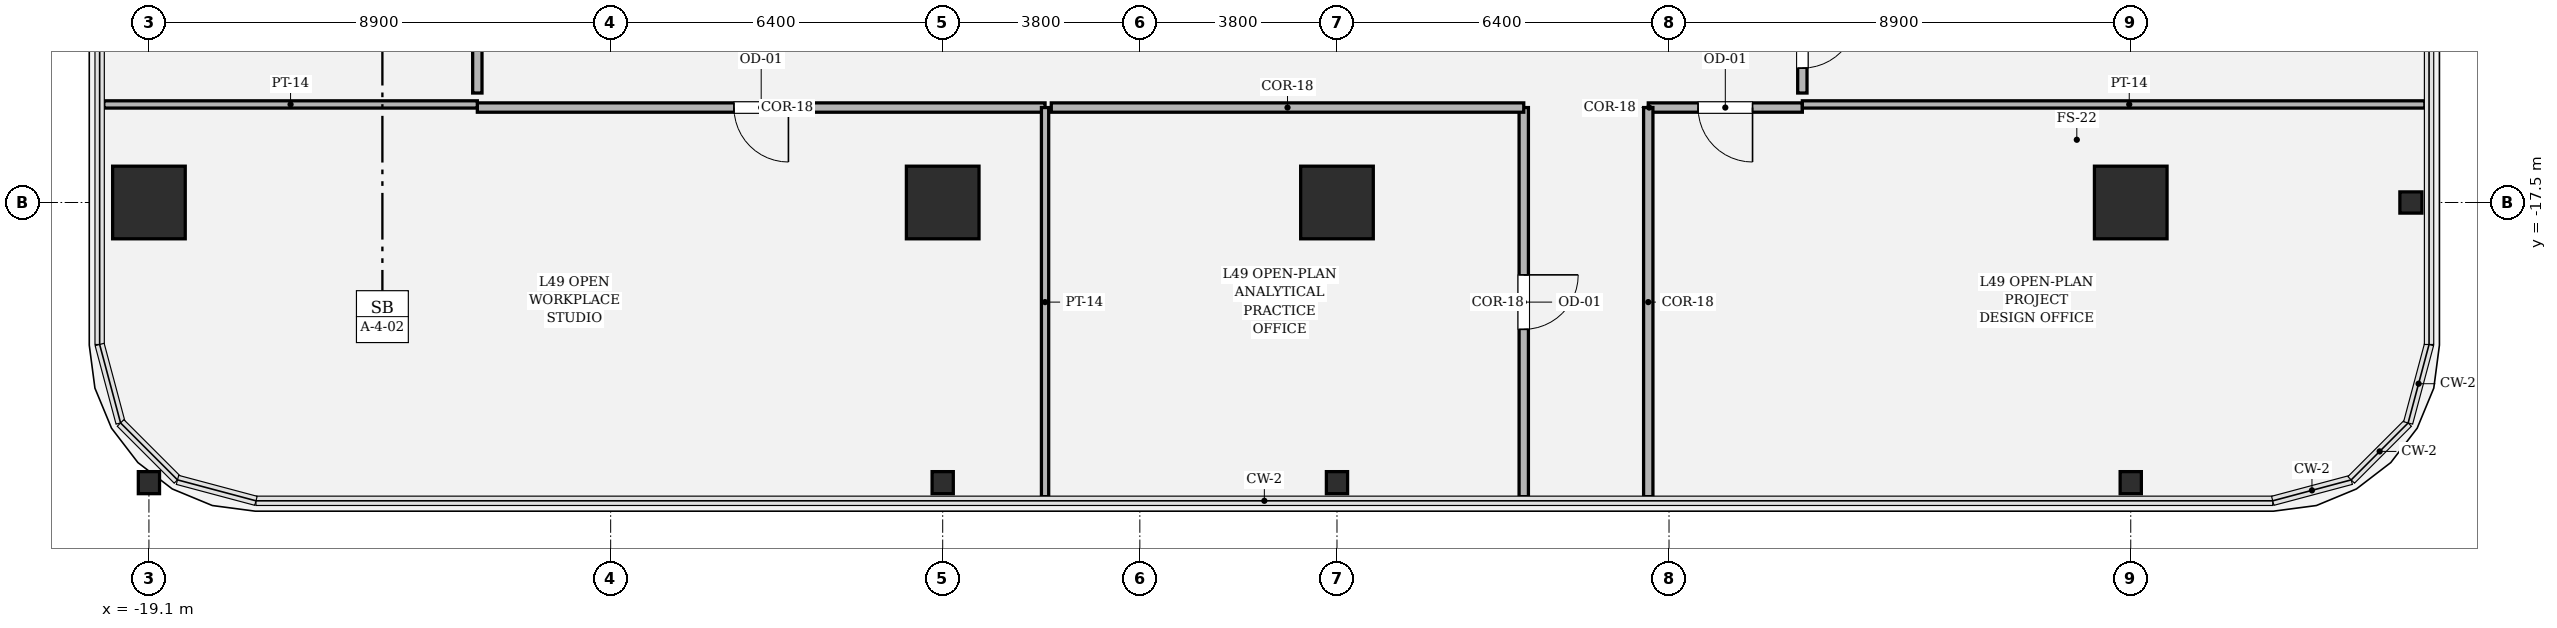
"""IFC4 building model, lengths in metres.
Left out: names, types, materials, properties, quantities, classifications, styles, units other than length and angle.
Written with IfcOpenShell. Run it as: python <this file> out.ifc"""

import sys

from ifc_helpers import new_model, si_unit, direction, frame, frame_2d, origin, origin_2d, place, context, subcontext, project, spatial, rectangle, hollow_rectangle, i_section, extrude, element, fill, save


model = new_model("IFC4")
c1 = context("Model", 3, precision=1e-05, world=origin(), true_north=direction((0.0, 1.0)))
c2 = subcontext(c1, "Body", "Model", "MODEL_VIEW")
j1 = project(units=[si_unit("LENGTHUNIT", "METRE"), si_unit("PLANEANGLEUNIT", "RADIAN")], contexts=[c1])
p1 = place(None, origin())
s1 = spatial("IfcSite", under=j1, at=p1, CompositionType="ELEMENT")
p2 = place(p1, origin())
s2 = spatial("IfcBuilding", under=s1, at=p2, CompositionType="ELEMENT")
p3 = place(p2, frame((0.0, 0.0, 208.65)))
s3 = spatial("IfcBuildingStorey", under=s2, at=p3, CompositionType="ELEMENT", Elevation=208.65)
for number, where, z_axis, x_axis in (
    (1, (-19.1, -17.5, 0.0), (0.0, 0.0, 1.0), (1.0, 0.0, 0.0)),
    (2, (-3.8, -17.5, 0.0), (0.0, 0.0, 1.0), (1.0, 0.0, 0.0)),
    (3, (3.8, -17.5, 0.0), (0.0, 0.0, 1.0), (1.0, 0.0, 0.0)),
    (4, (19.1, -17.5, 0.0), (0.0, 0.0, 1.0), (1.0, 0.0, 0.0)),
):
    element("IfcColumn", number, at=place(p3, frame(where, z_axis=z_axis, x_axis=x_axis)), inside=s3, PredefinedType="COLUMN", context=c2, shape_type="SweptSolid", body=[
        extrude(hollow_rectangle(XDim=1.4, YDim=1.4, WallThickness=0.042, at=origin_2d()), origin(), (0.0, 0.0, 1.0), 4.05),
    ])
for number, where, z_axis, x_axis in (
    (5, (-19.1, -22.9, 0.0), (0.0, 0.0, 1.0), (1.0, 0.0, 0.0)),
    (6, (-3.8, -22.9, 0.0), (0.0, 0.0, 1.0), (1.0, 0.0, 0.0)),
    (7, (3.8, -22.9, 0.0), (0.0, 0.0, 1.0), (1.0, 0.0, 0.0)),
    (8, (19.1, -22.9, 0.0), (0.0, 0.0, 1.0), (1.0, 0.0, 0.0)),
    (9, (24.5, -17.5, 0.0), (0.0, 0.0, 1.0), (0.0, 1.0, 0.0)),
):
    element("IfcColumn", number, at=place(p3, frame(where, z_axis=z_axis, x_axis=x_axis)), inside=s3, PredefinedType="COLUMN", context=c2, shape_type="SweptSolid", body=[
        extrude(i_section(OverallWidth=0.409, OverallDepth=0.425, WebThickness=0.032, FlangeThickness=0.052, FilletRadius=0.018, at=origin_2d()), origin(), (0.0, 0.0, 1.0), 4.048),
    ])
p4 = place(p3, frame((-12.77, -15.67, 0.0), z_axis=(0.0, 0.0, 1.0), x_axis=(1.0, 0.0, 0.0)))
e10 = element("IfcWall", 10, at=p4, inside=s3, PredefinedType="PARTITIONING", context=c2, shape_type="SweptSolid", body=[
    extrude(rectangle(XDim=10.943, YDim=0.18, at=frame_2d((5.472, 0.0))), origin(), (0.0, 0.0, 1.0), 3.174),
])
p5 = place(p4, frame((4.947, 0.0, 0.0)))
e11 = element("IfcOpeningElement", 11, at=p5, cuts=e10, PredefinedType="OPENING", context=c2, shape_type="SweptSolid", body=[
    extrude(rectangle(XDim=1.05, YDim=2.2, at=frame_2d((0.525, 1.1))), frame((0.0, 0.1, 0.0), z_axis=(0.0, -1.0, 0.0), x_axis=(1.0, 0.0, 0.0)), (0.0, 0.0, 1.0), 0.2),
])
p6 = place(p3, frame((-1.827, -15.67, 0.0), z_axis=(0.0, 0.0, 1.0), x_axis=(0.0, -1.0, 0.0)))
e12 = element("IfcWall", 12, at=p6, inside=s3, PredefinedType="PARTITIONING", context=c2, shape_type="SweptSolid", body=[
    extrude(rectangle(XDim=7.5, YDim=0.14, at=frame_2d((3.75, 0.0))), origin(), (0.0, 0.0, 1.0), 2.544),
])
p7 = place(p3, frame((-19.97, -15.61, 0.0), z_axis=(0.0, 0.0, 1.0), x_axis=(1.0, 0.0, 0.0)))
e13 = element("IfcWall", 13, at=p7, inside=s3, PredefinedType="PARTITIONING", context=c2, shape_type="SweptSolid", body=[
    extrude(rectangle(XDim=7.2, YDim=0.14, at=frame_2d((3.6, 0.0))), origin(), (0.0, 0.0, 1.0), 3.174),
])
p8 = place(p3, frame((7.4, -15.67, 0.0), z_axis=(0.0, 0.0, 1.0), x_axis=(0.0, -1.0, 0.0)))
e14 = element("IfcWall", 14, at=p8, inside=s3, PredefinedType="PARTITIONING", context=c2, shape_type="SweptSolid", body=[
    extrude(rectangle(XDim=7.5, YDim=0.18, at=frame_2d((3.75, 0.0))), origin(), (0.0, 0.0, 1.0), 2.544),
])
p9 = place(p8, frame((3.225, 0.0, 0.0)))
e15 = element("IfcOpeningElement", 15, at=p9, cuts=e14, PredefinedType="OPENING", context=c2, shape_type="SweptSolid", body=[
    extrude(rectangle(XDim=1.05, YDim=2.2, at=frame_2d((0.525, 1.1))), frame((0.0, 0.1, 0.0), z_axis=(0.0, -1.0, 0.0), x_axis=(1.0, 0.0, 0.0)), (0.0, 0.0, 1.0), 0.2),
])
p10 = place(p3, frame((-1.707, -15.67, 0.0), z_axis=(0.0, 0.0, 1.0), x_axis=(1.0, 0.0, 0.0)))
e16 = element("IfcWall", 16, at=p10, inside=s3, PredefinedType="PARTITIONING", context=c2, shape_type="SweptSolid", body=[
    extrude(rectangle(XDim=9.107, YDim=0.18, at=frame_2d((4.553, 0.0))), origin(), (0.0, 0.0, 1.0), 3.174),
])
p11 = place(p3, frame((9.8, -15.67, 0.0), z_axis=(0.0, 0.0, 1.0), x_axis=(1.0, 0.0, 0.0)))
e17 = element("IfcWall", 17, at=p11, inside=s3, PredefinedType="PARTITIONING", context=c2, shape_type="SweptSolid", body=[
    extrude(rectangle(XDim=2.97, YDim=0.18, at=frame_2d((1.485, 0.0))), origin(), (0.0, 0.0, 1.0), 3.174),
])
p12 = place(p11, frame((0.96, 0.0, 0.0)))
e18 = element("IfcOpeningElement", 18, at=p12, cuts=e17, PredefinedType="OPENING", context=c2, shape_type="SweptSolid", body=[
    extrude(rectangle(XDim=1.05, YDim=2.2, at=frame_2d((0.525, 1.1))), frame((0.0, 0.1, 0.0), z_axis=(0.0, -1.0, 0.0), x_axis=(1.0, 0.0, 0.0)), (0.0, 0.0, 1.0), 0.2),
])
p13 = place(p3, frame((12.77, -15.61, 0.0), z_axis=(0.0, 0.0, 1.0), x_axis=(1.0, 0.0, 0.0)))
e19 = element("IfcWall", 19, at=p13, inside=s3, PredefinedType="PARTITIONING", context=c2, shape_type="SweptSolid", body=[
    extrude(rectangle(XDim=12.0, YDim=0.14, at=frame_2d((6.0, 0.0))), origin(), (0.0, 0.0, 1.0), 2.544),
])
p14 = place(p3, frame((9.8, -23.17, 0.0), z_axis=(0.0, 0.0, 1.0), x_axis=(0.0, 1.0, 0.0)))
e20 = element("IfcWall", 20, at=p14, inside=s3, PredefinedType="PARTITIONING", context=c2, shape_type="SweptSolid", body=[
    extrude(rectangle(XDim=7.5, YDim=0.18, at=frame_2d((3.75, 0.0))), origin(), (0.0, 0.0, 1.0), 2.544),
])
p15 = place(p3, frame((-12.77, -13.38, 0.0), z_axis=(0.0, 0.0, 1.0), x_axis=(0.0, -1.0, 0.0)))
e21 = element("IfcWall", 21, at=p15, inside=s3, PredefinedType="PARTITIONING", context=c2, shape_type="SweptSolid", body=[
    extrude(rectangle(XDim=2.01, YDim=0.18, at=frame_2d((1.005, 0.0))), origin(), (0.0, 0.0, 1.0), 3.424),
])
p16 = place(p3, frame((12.77, -15.39, 0.0), z_axis=(0.0, 0.0, 1.0), x_axis=(0.0, 1.0, 0.0)))
e22 = element("IfcWall", 22, at=p16, inside=s3, PredefinedType="PARTITIONING", context=c2, shape_type="SweptSolid", body=[
    extrude(rectangle(XDim=2.01, YDim=0.18, at=frame_2d((1.005, 0.0))), origin(), (0.0, 0.0, 1.0), 3.424),
])
p17 = place(p16, frame((0.48, 0.0, 0.0)))
e23 = element("IfcOpeningElement", 23, at=p17, cuts=e22, PredefinedType="OPENING", context=c2, shape_type="SweptSolid", body=[
    extrude(rectangle(XDim=1.05, YDim=2.2, at=frame_2d((0.525, 1.1))), frame((0.0, 0.1, 0.0), z_axis=(0.0, -1.0, 0.0), x_axis=(1.0, 0.0, 0.0)), (0.0, 0.0, 1.0), 0.2),
])
p18 = place(p5, origin())
e24 = element("IfcDoor", 24, at=p18, inside=s3, OperationType="SINGLE_SWING_RIGHT", PredefinedType="DOOR", context=c2, shape_type="SweptSolid", body=[
    extrude(rectangle(XDim=1.05, YDim=2.2, at=frame_2d((0.525, 1.1))), frame((0.0, 0.025, 0.0), z_axis=(0.0, -1.0, 0.0), x_axis=(1.0, 0.0, 0.0)), (0.0, 0.0, 1.0), 0.05),
])
fill(e11, e24)
p19 = place(p9, origin())
e25 = element("IfcDoor", 25, at=p19, inside=s3, OperationType="SINGLE_SWING_LEFT", PredefinedType="DOOR", context=c2, shape_type="SweptSolid", body=[
    extrude(rectangle(XDim=1.05, YDim=2.2, at=frame_2d((0.525, 1.1))), frame((0.0, 0.025, 0.0), z_axis=(0.0, -1.0, 0.0), x_axis=(1.0, 0.0, 0.0)), (0.0, 0.0, 1.0), 0.05),
])
fill(e15, e25)
p20 = place(p12, origin())
e26 = element("IfcDoor", 26, at=p20, inside=s3, OperationType="SINGLE_SWING_RIGHT", PredefinedType="DOOR", context=c2, shape_type="SweptSolid", body=[
    extrude(rectangle(XDim=1.05, YDim=2.2, at=frame_2d((0.525, 1.1))), frame((0.0, 0.025, 0.0), z_axis=(0.0, -1.0, 0.0), x_axis=(1.0, 0.0, 0.0)), (0.0, 0.0, 1.0), 0.05),
])
fill(e18, e26)
p21 = place(p17, origin())
e27 = element("IfcDoor", 27, at=p21, inside=s3, OperationType="SINGLE_SWING_RIGHT", PredefinedType="DOOR", context=c2, shape_type="SweptSolid", body=[
    extrude(rectangle(XDim=1.05, YDim=2.2, at=frame_2d((0.525, 1.1))), frame((0.0, 0.025, 0.0), z_axis=(0.0, -1.0, 0.0), x_axis=(1.0, 0.0, 0.0)), (0.0, 0.0, 1.0), 0.05),
])
fill(e23, e27)
save(model, sys.argv[1])
